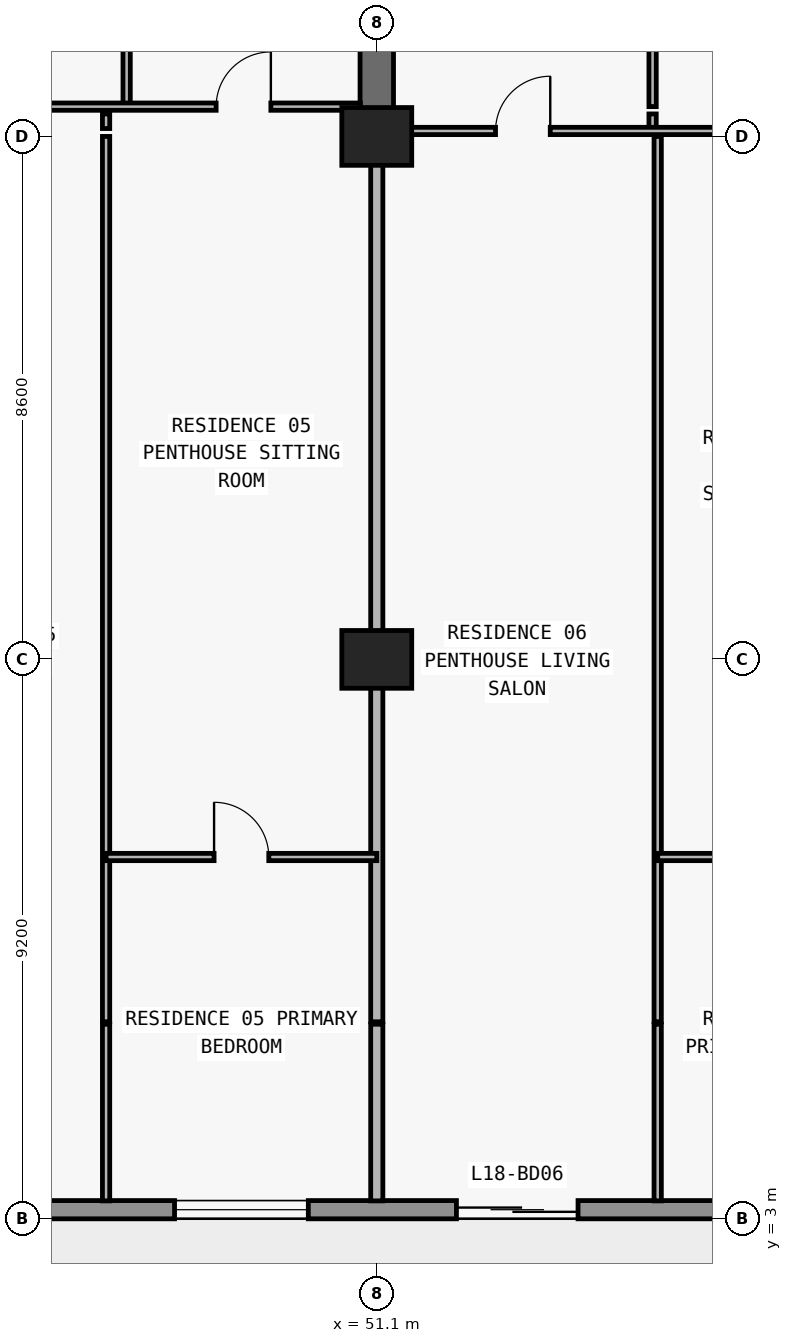
"""IFC4 building model, lengths in metres.
Left out: names, types, materials, properties, quantities, classifications, styles, units other than length and angle.
Written with IfcOpenShell. Run it as: python <this file> out.ifc"""

import sys

from ifc_helpers import new_model, si_unit, direction, frame, frame_2d, origin, origin_2d, place, context, subcontext, project, spatial, rectangle, extrude, element, fill, save


model = new_model("IFC4")
c1 = context("Model", 3, precision=1e-05, world=origin(), true_north=direction((0.0, 1.0)))
c2 = subcontext(c1, "Body", "Model", "MODEL_VIEW")
j1 = project(units=[si_unit("LENGTHUNIT", "METRE"), si_unit("PLANEANGLEUNIT", "RADIAN")], contexts=[c1])
p1 = place(None, origin())
s1 = spatial("IfcSite", under=j1, at=p1, CompositionType="ELEMENT")
p2 = place(p1, origin())
s2 = spatial("IfcBuilding", under=s1, at=p2, CompositionType="ELEMENT")
p3 = place(p2, frame((0.0, 0.0, 69.6)))
s3 = spatial("IfcBuildingStorey", under=s2, at=p3, CompositionType="ELEMENT", Elevation=69.6)
for number, where, z_axis, x_axis in (
    (1, (51.1, 12.2, 0.0), (0.0, 0.0, 1.0), (1.0, 0.0, 0.0)),
    (2, (51.1, 20.8, 0.0), (0.0, 0.0, 1.0), (1.0, 0.0, 0.0)),
):
    element("IfcColumn", number, at=place(p3, frame(where, z_axis=z_axis, x_axis=x_axis)), inside=s3, PredefinedType="COLUMN", context=c2, shape_type="SweptSolid", body=[
        extrude(rectangle(XDim=1.15, YDim=0.95, at=origin_2d()), origin(), (0.0, 0.0, 1.0), 3.05),
    ])
p4 = place(p3, frame((51.1, 20.8, 0.0), z_axis=(0.0, 0.0, 1.0), x_axis=(0.0, 1.0, 0.0)))
e3 = element("IfcWall", 3, at=p4, inside=s3, PredefinedType="SHEAR", context=c2, shape_type="SweptSolid", body=[
    extrude(rectangle(XDim=8.6, YDim=0.55, at=frame_2d((4.3, 0.0))), origin(), (0.0, 0.0, 1.0), 3.05),
])
p5 = place(p3, frame((72.7, 3.15, 0.0), z_axis=(0.0, 0.0, 1.0), x_axis=(-1.0, 0.0, 0.0)))
e4 = element("IfcWall", 4, at=p5, inside=s3, PredefinedType="STANDARD", context=c2, shape_type="SweptSolid", body=[
    extrude(rectangle(XDim=67.6, YDim=0.3, at=frame_2d((33.8, 0.0))), origin(), (0.0, 0.0, 1.0), 3.05),
])
p6 = place(p5, frame((59.826, 0.0, 0.0)))
e5 = element("IfcOpeningElement", 5, at=p6, cuts=e4, PredefinedType="OPENING", context=c2, shape_type="SweptSolid", body=[
    extrude(rectangle(XDim=2.0, YDim=2.3, at=frame_2d((1.0, 1.15))), frame((0.0, 0.16, 0.0), z_axis=(0.0, -1.0, 0.0), x_axis=(1.0, 0.0, 0.0)), (0.0, 0.0, 1.0), 0.32),
])
p7 = place(p5, frame((55.526, 0.0, 0.85)))
e6 = element("IfcOpeningElement", 6, at=p7, cuts=e4, PredefinedType="OPENING", context=c2, shape_type="SweptSolid", body=[
    extrude(rectangle(XDim=2.2, YDim=1.55, at=frame_2d((1.1, 0.775))), frame((0.0, 0.16, 0.0), z_axis=(0.0, -1.0, 0.0), x_axis=(1.0, 0.0, 0.0)), (0.0, 0.0, 1.0), 0.32),
])
p8 = place(p5, frame((51.09, 0.0, 0.0)))
e7 = element("IfcOpeningElement", 7, at=p8, cuts=e4, PredefinedType="OPENING", context=c2, shape_type="SweptSolid", body=[
    extrude(rectangle(XDim=2.0, YDim=2.3, at=frame_2d((1.0, 1.15))), frame((0.0, 0.16, 0.0), z_axis=(0.0, -1.0, 0.0), x_axis=(1.0, 0.0, 0.0)), (0.0, 0.0, 1.0), 0.32),
])
p9 = place(p5, frame((46.99, 0.0, 0.85)))
e8 = element("IfcOpeningElement", 8, at=p9, cuts=e4, PredefinedType="OPENING", context=c2, shape_type="SweptSolid", body=[
    extrude(rectangle(XDim=1.8, YDim=1.55, at=frame_2d((0.9, 0.775))), frame((0.0, 0.16, 0.0), z_axis=(0.0, -1.0, 0.0), x_axis=(1.0, 0.0, 0.0)), (0.0, 0.0, 1.0), 0.32),
])
p10 = place(p5, frame((43.026, 0.0, 0.0)))
e9 = element("IfcOpeningElement", 9, at=p10, cuts=e4, PredefinedType="OPENING", context=c2, shape_type="SweptSolid", body=[
    extrude(rectangle(XDim=2.0, YDim=2.3, at=frame_2d((1.0, 1.15))), frame((0.0, 0.16, 0.0), z_axis=(0.0, -1.0, 0.0), x_axis=(1.0, 0.0, 0.0)), (0.0, 0.0, 1.0), 0.32),
])
p11 = place(p5, frame((38.726, 0.0, 0.85)))
e10 = element("IfcOpeningElement", 10, at=p11, cuts=e4, PredefinedType="OPENING", context=c2, shape_type="SweptSolid", body=[
    extrude(rectangle(XDim=2.2, YDim=1.55, at=frame_2d((1.1, 0.775))), frame((0.0, 0.16, 0.0), z_axis=(0.0, -1.0, 0.0), x_axis=(1.0, 0.0, 0.0)), (0.0, 0.0, 1.0), 0.32),
])
p12 = place(p5, frame((34.51, 0.0, 0.0)))
e11 = element("IfcOpeningElement", 11, at=p12, cuts=e4, PredefinedType="OPENING", context=c2, shape_type="SweptSolid", body=[
    extrude(rectangle(XDim=2.0, YDim=2.3, at=frame_2d((1.0, 1.15))), frame((0.0, 0.16, 0.0), z_axis=(0.0, -1.0, 0.0), x_axis=(1.0, 0.0, 0.0)), (0.0, 0.0, 1.0), 0.32),
])
p13 = place(p5, frame((30.81, 0.0, 0.85)))
e12 = element("IfcOpeningElement", 12, at=p13, cuts=e4, PredefinedType="OPENING", context=c2, shape_type="SweptSolid", body=[
    extrude(rectangle(XDim=1.8, YDim=1.55, at=frame_2d((0.9, 0.775))), frame((0.0, 0.16, 0.0), z_axis=(0.0, -1.0, 0.0), x_axis=(1.0, 0.0, 0.0)), (0.0, 0.0, 1.0), 0.32),
])
p14 = place(p5, frame((27.026, 0.0, 0.0)))
e13 = element("IfcOpeningElement", 13, at=p14, cuts=e4, PredefinedType="OPENING", context=c2, shape_type="SweptSolid", body=[
    extrude(rectangle(XDim=2.0, YDim=2.3, at=frame_2d((1.0, 1.15))), frame((0.0, 0.16, 0.0), z_axis=(0.0, -1.0, 0.0), x_axis=(1.0, 0.0, 0.0)), (0.0, 0.0, 1.0), 0.32),
])
p15 = place(p5, frame((22.726, 0.0, 0.85)))
e14 = element("IfcOpeningElement", 14, at=p15, cuts=e4, PredefinedType="OPENING", context=c2, shape_type="SweptSolid", body=[
    extrude(rectangle(XDim=2.2, YDim=1.55, at=frame_2d((1.1, 0.775))), frame((0.0, 0.16, 0.0), z_axis=(0.0, -1.0, 0.0), x_axis=(1.0, 0.0, 0.0)), (0.0, 0.0, 1.0), 0.32),
])
p16 = place(p5, frame((18.29, 0.0, 0.0)))
e15 = element("IfcOpeningElement", 15, at=p16, cuts=e4, PredefinedType="OPENING", context=c2, shape_type="SweptSolid", body=[
    extrude(rectangle(XDim=2.0, YDim=2.3, at=frame_2d((1.0, 1.15))), frame((0.0, 0.16, 0.0), z_axis=(0.0, -1.0, 0.0), x_axis=(1.0, 0.0, 0.0)), (0.0, 0.0, 1.0), 0.32),
])
p17 = place(p5, frame((14.19, 0.0, 0.85)))
e16 = element("IfcOpeningElement", 16, at=p17, cuts=e4, PredefinedType="OPENING", context=c2, shape_type="SweptSolid", body=[
    extrude(rectangle(XDim=1.8, YDim=1.55, at=frame_2d((0.9, 0.775))), frame((0.0, 0.16, 0.0), z_axis=(0.0, -1.0, 0.0), x_axis=(1.0, 0.0, 0.0)), (0.0, 0.0, 1.0), 0.32),
])
p18 = place(p5, frame((10.226, 0.0, 0.0)))
e17 = element("IfcOpeningElement", 17, at=p18, cuts=e4, PredefinedType="OPENING", context=c2, shape_type="SweptSolid", body=[
    extrude(rectangle(XDim=2.0, YDim=2.3, at=frame_2d((1.0, 1.15))), frame((0.0, 0.16, 0.0), z_axis=(0.0, -1.0, 0.0), x_axis=(1.0, 0.0, 0.0)), (0.0, 0.0, 1.0), 0.32),
])
p19 = place(p5, frame((5.926, 0.0, 0.85)))
e18 = element("IfcOpeningElement", 18, at=p19, cuts=e4, PredefinedType="OPENING", context=c2, shape_type="SweptSolid", body=[
    extrude(rectangle(XDim=2.2, YDim=1.55, at=frame_2d((1.1, 0.775))), frame((0.0, 0.16, 0.0), z_axis=(0.0, -1.0, 0.0), x_axis=(1.0, 0.0, 0.0)), (0.0, 0.0, 1.0), 0.32),
])
p20 = place(p3, frame((46.648, 3.295, 0.0), z_axis=(0.0, 0.0, 1.0), x_axis=(0.0, 1.0, 0.0)))
e19 = element("IfcWall", 19, at=p20, inside=s3, PredefinedType="PARTITIONING", context=c2, shape_type="SweptSolid", body=[
    extrude(rectangle(XDim=2.905, YDim=0.12, at=frame_2d((1.453, 0.0))), origin(), (0.0, 0.0, 1.0), 3.05),
])
p21 = place(p3, frame((46.648, 6.24, 0.0), z_axis=(0.0, 0.0, 1.0), x_axis=(0.0, 1.0, 0.0)))
e20 = element("IfcWall", 20, at=p21, inside=s3, PredefinedType="PARTITIONING", context=c2, shape_type="SweptSolid", body=[
    extrude(rectangle(XDim=14.56, YDim=0.12, at=frame_2d((7.28, 0.0))), origin(), (0.0, 0.0, 1.0), 3.05),
])
p22 = place(p3, frame((46.648, 20.93, 0.0), z_axis=(0.0, 0.0, 1.0), x_axis=(0.0, 1.0, 0.0)))
e21 = element("IfcWall", 21, at=p22, inside=s3, PredefinedType="PARTITIONING", context=c2, shape_type="SweptSolid", body=[
    extrude(rectangle(XDim=0.24, YDim=0.12, at=frame_2d((0.12, 0.0))), origin(), (0.0, 0.0, 1.0), 3.05),
])
p23 = place(p3, frame((46.986, 21.29, 0.0), z_axis=(0.0, 0.0, 1.0), x_axis=(0.0, 1.0, 0.0)))
e22 = element("IfcWall", 22, at=p23, inside=s3, PredefinedType="PARTITIONING", context=c2, shape_type="SweptSolid", body=[
    extrude(rectangle(XDim=4.69, YDim=0.12, at=frame_2d((2.345, 0.0))), origin(), (0.0, 0.0, 1.0), 3.05),
])
p24 = place(p23, frame((1.895, 0.0, 0.0)))
e23 = element("IfcOpeningElement", 23, at=p24, cuts=e22, PredefinedType="OPENING", context=c2, shape_type="SweptSolid", body=[
    extrude(rectangle(XDim=0.9, YDim=2.15, at=frame_2d((0.45, 1.075))), frame((0.0, 0.07, 0.0), z_axis=(0.0, -1.0, 0.0), x_axis=(1.0, 0.0, 0.0)), (0.0, 0.0, 1.0), 0.14),
])
p25 = place(p3, frame((51.1, 3.295, 0.0), z_axis=(0.0, 0.0, 1.0), x_axis=(0.0, 1.0, 0.0)))
e24 = element("IfcWall", 24, at=p25, inside=s3, PredefinedType="PARTITIONING", context=c2, shape_type="SweptSolid", body=[
    extrude(rectangle(XDim=2.905, YDim=0.2, at=frame_2d((1.453, 0.0))), origin(), (0.0, 0.0, 1.0), 3.05),
])
p26 = place(p3, frame((51.1, 6.24, 0.0), z_axis=(0.0, 0.0, 1.0), x_axis=(0.0, 1.0, 0.0)))
e25 = element("IfcWall", 25, at=p26, inside=s3, PredefinedType="PARTITIONING", context=c2, shape_type="SweptSolid", body=[
    extrude(rectangle(XDim=14.555, YDim=0.2, at=frame_2d((7.277, 0.0))), origin(), (0.0, 0.0, 1.0), 2.11),
])
p27 = place(p3, frame((55.636, 20.93, 0.0), z_axis=(0.0, 0.0, 1.0), x_axis=(0.0, 1.0, 0.0)))
e26 = element("IfcWall", 26, at=p27, inside=s3, PredefinedType="PARTITIONING", context=c2, shape_type="SweptSolid", body=[
    extrude(rectangle(XDim=0.24, YDim=0.12, at=frame_2d((0.12, 0.0))), origin(), (0.0, 0.0, 1.0), 3.05),
])
p28 = place(p3, frame((55.636, 21.29, 0.0), z_axis=(0.0, 0.0, 1.0), x_axis=(0.0, 1.0, 0.0)))
e27 = element("IfcWall", 27, at=p28, inside=s3, PredefinedType="PARTITIONING", context=c2, shape_type="SweptSolid", body=[
    extrude(rectangle(XDim=4.69, YDim=0.12, at=frame_2d((2.345, 0.0))), origin(), (0.0, 0.0, 1.0), 3.05),
])
p29 = place(p28, frame((1.895, 0.0, 0.0)))
e28 = element("IfcOpeningElement", 28, at=p29, cuts=e27, PredefinedType="OPENING", context=c2, shape_type="SweptSolid", body=[
    extrude(rectangle(XDim=0.9, YDim=2.15, at=frame_2d((0.45, 1.075))), frame((0.0, 0.07, 0.0), z_axis=(0.0, -1.0, 0.0), x_axis=(1.0, 0.0, 0.0)), (0.0, 0.0, 1.0), 0.14),
])
p30 = place(p3, frame((55.72, 3.295, 0.0), z_axis=(0.0, 0.0, 1.0), x_axis=(0.0, 1.0, 0.0)))
e29 = element("IfcWall", 29, at=p30, inside=s3, PredefinedType="PARTITIONING", context=c2, shape_type="SweptSolid", body=[
    extrude(rectangle(XDim=2.905, YDim=0.12, at=frame_2d((1.453, 0.0))), origin(), (0.0, 0.0, 1.0), 3.05),
])
p31 = place(p3, frame((55.72, 6.24, 0.0), z_axis=(0.0, 0.0, 1.0), x_axis=(0.0, 1.0, 0.0)))
e30 = element("IfcWall", 30, at=p31, inside=s3, PredefinedType="PARTITIONING", context=c2, shape_type="SweptSolid", body=[
    extrude(rectangle(XDim=14.56, YDim=0.12, at=frame_2d((7.28, 0.0))), origin(), (0.0, 0.0, 1.0), 3.05),
])
p32 = place(p3, frame((46.648, 8.95, 0.0), z_axis=(0.0, 0.0, 1.0), x_axis=(1.0, 0.0, 0.0)))
e31 = element("IfcWall", 31, at=p32, inside=s3, PredefinedType="PARTITIONING", context=c2, shape_type="SweptSolid", body=[
    extrude(rectangle(XDim=4.452, YDim=0.12, at=frame_2d((2.226, 0.0))), origin(), (0.0, 0.0, 1.0), 3.05),
])
p33 = place(p32, frame((1.776, 0.0, 0.0)))
e32 = element("IfcOpeningElement", 32, at=p33, cuts=e31, PredefinedType="OPENING", context=c2, shape_type="SweptSolid", body=[
    extrude(rectangle(XDim=0.9, YDim=2.15, at=frame_2d((0.45, 1.075))), frame((0.0, 0.07, 0.0), z_axis=(0.0, -1.0, 0.0), x_axis=(1.0, 0.0, 0.0)), (0.0, 0.0, 1.0), 0.14),
])
p34 = place(p3, frame((55.72, 8.95, 0.0), z_axis=(0.0, 0.0, 1.0), x_axis=(1.0, 0.0, 0.0)))
e33 = element("IfcWall", 33, at=p34, inside=s3, PredefinedType="PARTITIONING", context=c2, shape_type="SweptSolid", body=[
    extrude(rectangle(XDim=3.78, YDim=0.12, at=frame_2d((1.89, 0.0))), origin(), (0.0, 0.0, 1.0), 3.05),
])
p35 = place(p34, frame((1.44, 0.0, 0.0)))
e34 = element("IfcOpeningElement", 34, at=p35, cuts=e33, PredefinedType="OPENING", context=c2, shape_type="SweptSolid", body=[
    extrude(rectangle(XDim=0.9, YDim=2.15, at=frame_2d((0.45, 1.075))), frame((0.0, 0.07, 0.0), z_axis=(0.0, -1.0, 0.0), x_axis=(1.0, 0.0, 0.0)), (0.0, 0.0, 1.0), 0.14),
])
p36 = place(p3, frame((51.37, 20.89, 0.0), z_axis=(0.0, 0.0, 1.0), x_axis=(1.0, 0.0, 0.0)))
e35 = element("IfcWall", 35, at=p36, inside=s3, PredefinedType="PARTITIONING", context=c2, shape_type="SweptSolid", body=[
    extrude(rectangle(XDim=8.13, YDim=0.12, at=frame_2d((4.065, 0.0))), origin(), (0.0, 0.0, 1.0), 2.11),
])
p37 = place(p36, frame((1.683, 0.0, 0.0)))
e36 = element("IfcOpeningElement", 36, at=p37, cuts=e35, PredefinedType="OPENING", context=c2, shape_type="SweptSolid", body=[
    extrude(rectangle(XDim=0.9, YDim=2.06, at=frame_2d((0.45, 1.03))), frame((0.0, 0.07, 0.0), z_axis=(0.0, -1.0, 0.0), x_axis=(1.0, 0.0, 0.0)), (0.0, 0.0, 1.0), 0.14),
])
p38 = place(p36, frame((5.79, 0.0, 0.0)))
e37 = element("IfcOpeningElement", 37, at=p38, cuts=e35, PredefinedType="OPENING", context=c2, shape_type="SweptSolid", body=[
    extrude(rectangle(XDim=0.9, YDim=2.06, at=frame_2d((0.45, 1.03))), frame((0.0, 0.07, 0.0), z_axis=(0.0, -1.0, 0.0), x_axis=(1.0, 0.0, 0.0)), (0.0, 0.0, 1.0), 0.14),
])
p39 = place(p3, frame((42.7, 21.29, 0.0), z_axis=(0.0, 0.0, 1.0), x_axis=(1.0, 0.0, 0.0)))
e38 = element("IfcWall", 38, at=p39, inside=s3, PredefinedType="PARTITIONING", context=c2, shape_type="SweptSolid", body=[
    extrude(rectangle(XDim=8.13, YDim=0.12, at=frame_2d((4.065, 0.0))), origin(), (0.0, 0.0, 1.0), 3.05),
])
p40 = place(p39, frame((1.524, 0.0, 0.0)))
e39 = element("IfcOpeningElement", 39, at=p40, cuts=e38, PredefinedType="OPENING", context=c2, shape_type="SweptSolid", body=[
    extrude(rectangle(XDim=0.9, YDim=2.15, at=frame_2d((0.45, 1.075))), frame((0.0, 0.07, 0.0), z_axis=(0.0, -1.0, 0.0), x_axis=(1.0, 0.0, 0.0)), (0.0, 0.0, 1.0), 0.14),
])
p41 = place(p39, frame((5.758, 0.0, 0.0)))
e40 = element("IfcOpeningElement", 40, at=p41, cuts=e38, PredefinedType="OPENING", context=c2, shape_type="SweptSolid", body=[
    extrude(rectangle(XDim=0.9, YDim=2.15, at=frame_2d((0.45, 1.075))), frame((0.0, 0.07, 0.0), z_axis=(0.0, -1.0, 0.0), x_axis=(1.0, 0.0, 0.0)), (0.0, 0.0, 1.0), 0.14),
])
p42 = place(p15, origin())
e41 = element("IfcWindow", 41, at=p42, inside=s3, PartitioningType="SINGLE_PANEL", PredefinedType="WINDOW", context=c2, shape_type="SweptSolid", body=[
    extrude(rectangle(XDim=2.2, YDim=1.55, at=frame_2d((1.1, 0.775))), frame((0.0, 0.03, 0.0), z_axis=(0.0, -1.0, 0.0), x_axis=(1.0, 0.0, 0.0)), (0.0, 0.0, 1.0), 0.06),
])
fill(e14, e41)
p43 = place(p16, origin())
e42 = element("IfcDoor", 42, at=p43, inside=s3, OperationType="DOUBLE_DOOR_SLIDING", PredefinedType="DOOR", context=c2, shape_type="SweptSolid", body=[
    extrude(rectangle(XDim=2.0, YDim=2.3, at=frame_2d((1.0, 1.15))), frame((0.0, 0.025, 0.0), z_axis=(0.0, -1.0, 0.0), x_axis=(1.0, 0.0, 0.0)), (0.0, 0.0, 1.0), 0.05),
])
fill(e15, e42)
p44 = place(p41, origin())
e43 = element("IfcDoor", 43, at=p44, inside=s3, OperationType="SINGLE_SWING_RIGHT", PredefinedType="DOOR", context=c2, shape_type="SweptSolid", body=[
    extrude(rectangle(XDim=0.9, YDim=2.15, at=frame_2d((0.45, 1.075))), frame((0.0, 0.025, 0.0), z_axis=(0.0, -1.0, 0.0), x_axis=(1.0, 0.0, 0.0)), (0.0, 0.0, 1.0), 0.05),
])
fill(e40, e43)
p45 = place(p33, origin())
e44 = element("IfcDoor", 44, at=p45, inside=s3, OperationType="SINGLE_SWING_LEFT", PredefinedType="DOOR", context=c2, shape_type="SweptSolid", body=[
    extrude(rectangle(XDim=0.9, YDim=2.15, at=frame_2d((0.45, 1.075))), frame((0.0, 0.025, 0.0), z_axis=(0.0, -1.0, 0.0), x_axis=(1.0, 0.0, 0.0)), (0.0, 0.0, 1.0), 0.05),
])
fill(e32, e44)
p46 = place(p37, origin())
e45 = element("IfcDoor", 45, at=p46, inside=s3, OperationType="SINGLE_SWING_RIGHT", PredefinedType="DOOR", context=c2, shape_type="SweptSolid", body=[
    extrude(rectangle(XDim=0.9, YDim=2.06, at=frame_2d((0.45, 1.03))), frame((0.0, 0.025, 0.0), z_axis=(0.0, -1.0, 0.0), x_axis=(1.0, 0.0, 0.0)), (0.0, 0.0, 1.0), 0.05),
])
fill(e36, e45)
save(model, sys.argv[1])
